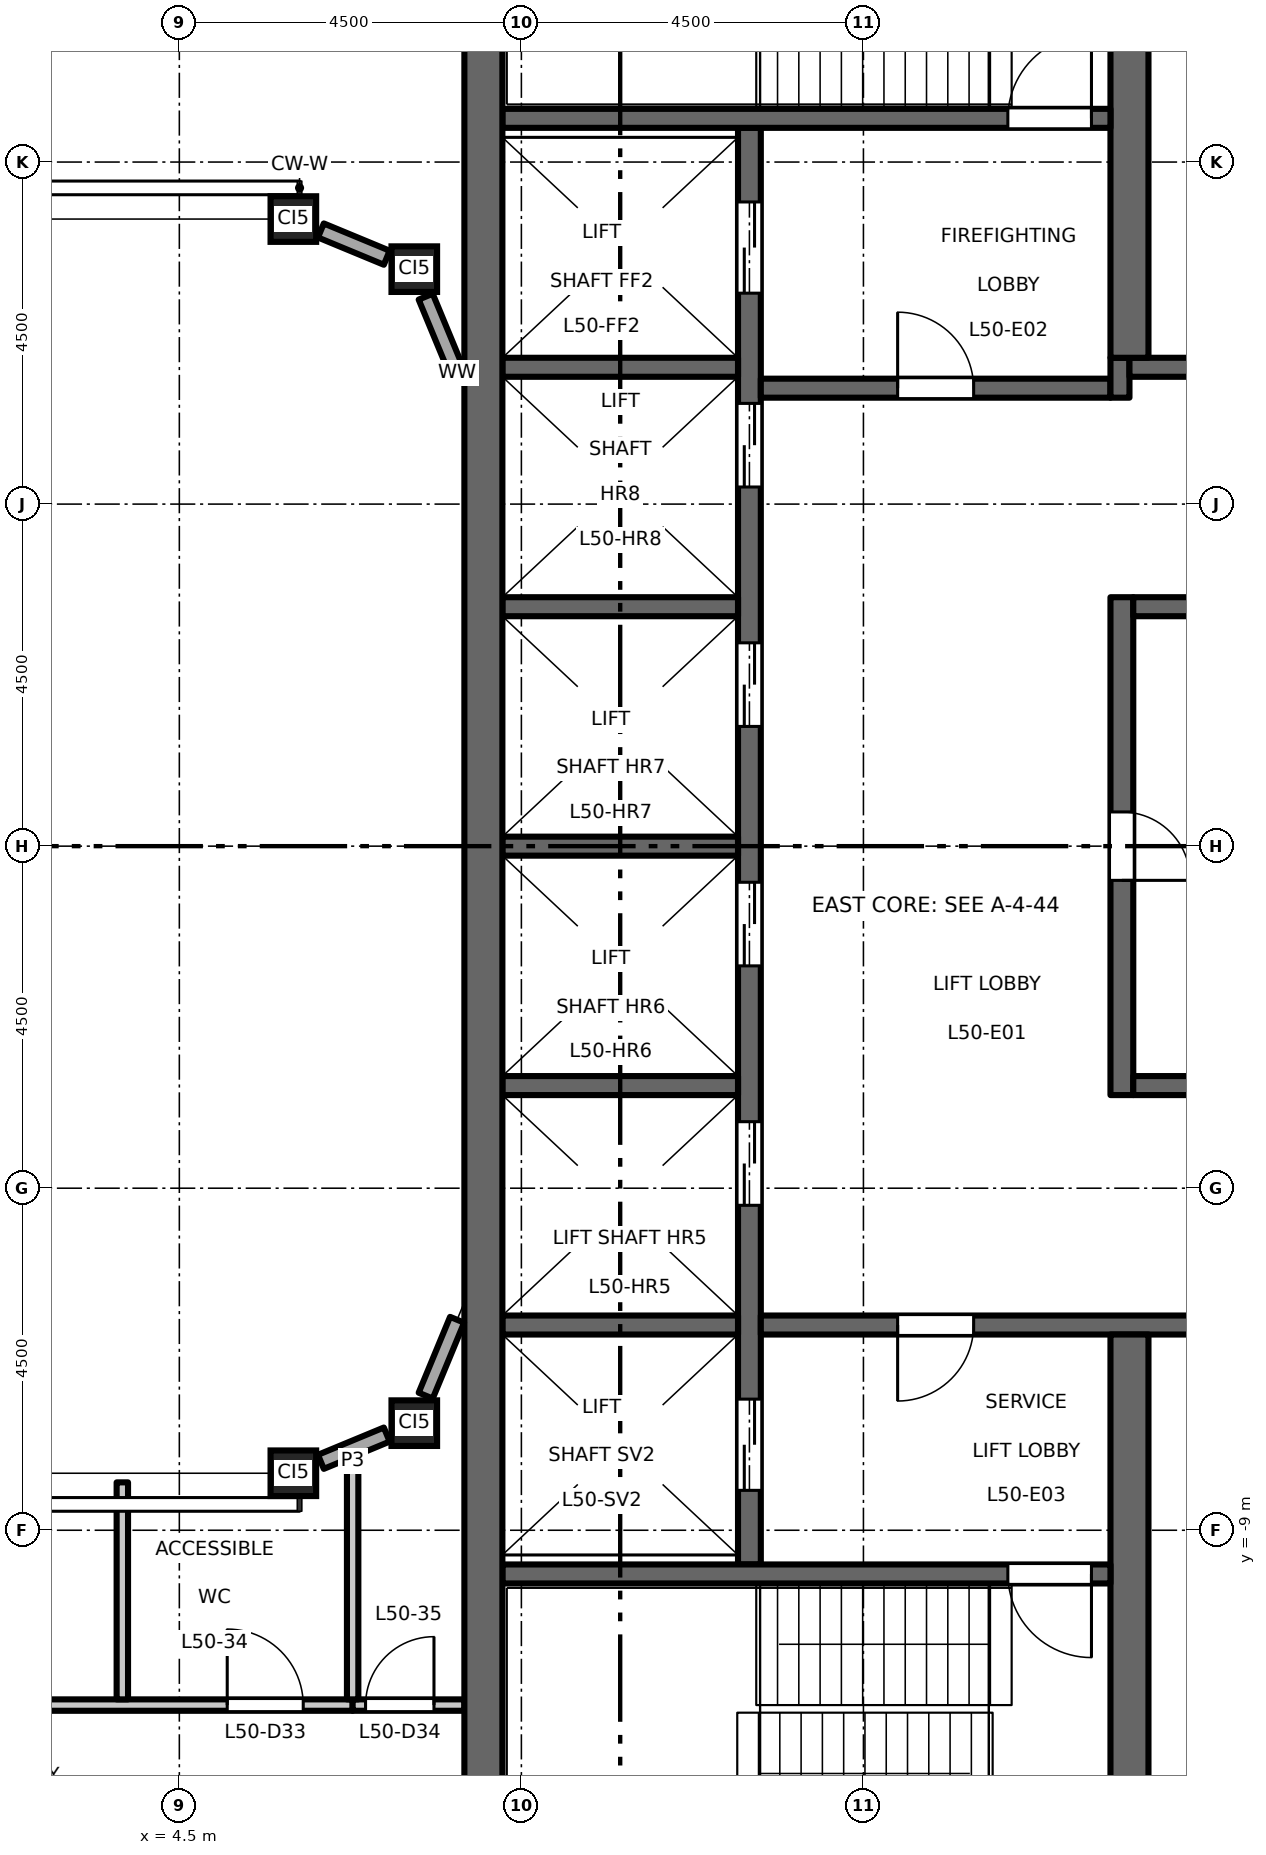
"""IFC4 building model, lengths in metres.
Left out: names, types, materials, properties, quantities, classifications, styles, units other than length and angle.
Written with IfcOpenShell. Run it as: python <this file> out.ifc"""

import sys

from ifc_helpers import new_model, si_unit, direction, frame, frame_2d, origin, origin_2d, place, context, subcontext, project, spatial, rectangle, hollow_rectangle, extrude, element, fill, save


model = new_model("IFC4")
c1 = context("Model", 3, precision=1e-05, world=origin(), true_north=direction((0.0, 1.0)))
c2 = subcontext(c1, "Body", "Model", "MODEL_VIEW")
j1 = project(units=[si_unit("LENGTHUNIT", "METRE"), si_unit("PLANEANGLEUNIT", "RADIAN")], contexts=[c1])
p1 = place(None, origin())
s1 = spatial("IfcSite", under=j1, at=p1, CompositionType="ELEMENT")
p2 = place(p1, origin())
s2 = spatial("IfcBuilding", under=s1, at=p2, CompositionType="ELEMENT")
p3 = place(p2, frame((0.0, 0.0, 233.2)))
s3 = spatial("IfcBuildingStorey", under=s2, at=p3, CompositionType="ELEMENT", Elevation=233.2)
for number, where, z_axis, x_axis in (
    (1, (6.0, -8.25, 0.0), (0.0, 0.0, 1.0), (1.0, 0.0, 0.0)),
    (2, (7.591, -7.591, 0.0), (0.0, 0.0, 1.0), (1.0, 0.0, 0.0)),
    (3, (6.0, 8.25, 0.0), (0.0, 0.0, 1.0), (1.0, 0.0, 0.0)),
    (4, (7.591, 7.591, 0.0), (0.0, 0.0, 1.0), (1.0, 0.0, 0.0)),
):
    element("IfcColumn", number, at=place(p3, frame(where, z_axis=z_axis, x_axis=x_axis)), inside=s3, PredefinedType="COLUMN", context=c2, shape_type="SweptSolid", body=[
        extrude(hollow_rectangle(XDim=0.6, YDim=0.6, WallThickness=0.032, at=origin_2d()), origin(), (0.0, 0.0, 1.0), 4.5),
    ])
p4 = place(p3, frame((12.0, -9.45, 0.0), z_axis=(0.0, 0.0, 1.0), x_axis=(0.0, 1.0, 0.0)))
e5 = element("IfcWall", 5, at=p4, inside=s3, PredefinedType="SHEAR", context=c2, shape_type="SweptSolid", body=[
    extrude(rectangle(XDim=18.9, YDim=0.3, at=frame_2d((9.45, 0.0))), origin(), (0.0, 0.0, 1.0), 4.35),
])
p5 = place(p4, frame((4.725, 0.0, 0.0)))
e6 = element("IfcOpeningElement", 6, at=p5, cuts=e5, PredefinedType="OPENING", context=c2, shape_type="SweptSolid", body=[
    extrude(rectangle(XDim=1.1, YDim=2.1, at=frame_2d((0.55, 1.05))), frame((0.0, 0.16, 0.0), z_axis=(0.0, -1.0, 0.0), x_axis=(1.0, 0.0, 0.0)), (0.0, 0.0, 1.0), 0.32),
])
p6 = place(p4, frame((7.875, 0.0, 0.0)))
e7 = element("IfcOpeningElement", 7, at=p6, cuts=e5, PredefinedType="OPENING", context=c2, shape_type="SweptSolid", body=[
    extrude(rectangle(XDim=1.1, YDim=2.1, at=frame_2d((0.55, 1.05))), frame((0.0, 0.16, 0.0), z_axis=(0.0, -1.0, 0.0), x_axis=(1.0, 0.0, 0.0)), (0.0, 0.0, 1.0), 0.32),
])
p7 = place(p4, frame((11.025, 0.0, 0.0)))
e8 = element("IfcOpeningElement", 8, at=p7, cuts=e5, PredefinedType="OPENING", context=c2, shape_type="SweptSolid", body=[
    extrude(rectangle(XDim=1.1, YDim=2.1, at=frame_2d((0.55, 1.05))), frame((0.0, 0.16, 0.0), z_axis=(0.0, -1.0, 0.0), x_axis=(1.0, 0.0, 0.0)), (0.0, 0.0, 1.0), 0.32),
])
p8 = place(p4, frame((14.175, 0.0, 0.0)))
e9 = element("IfcOpeningElement", 9, at=p8, cuts=e5, PredefinedType="OPENING", context=c2, shape_type="SweptSolid", body=[
    extrude(rectangle(XDim=1.1, YDim=2.1, at=frame_2d((0.55, 1.05))), frame((0.0, 0.16, 0.0), z_axis=(0.0, -1.0, 0.0), x_axis=(1.0, 0.0, 0.0)), (0.0, 0.0, 1.0), 0.32),
])
p9 = place(p4, frame((16.725, 0.0, 0.0)))
e10 = element("IfcOpeningElement", 10, at=p9, cuts=e5, PredefinedType="OPENING", context=c2, shape_type="SweptSolid", body=[
    extrude(rectangle(XDim=1.2, YDim=2.1, at=frame_2d((0.6, 1.05))), frame((0.0, 0.16, 0.0), z_axis=(0.0, -1.0, 0.0), x_axis=(1.0, 0.0, 0.0)), (0.0, 0.0, 1.0), 0.32),
])
p10 = place(p4, frame((0.975, 0.0, 0.0)))
e11 = element("IfcOpeningElement", 11, at=p10, cuts=e5, PredefinedType="OPENING", context=c2, shape_type="SweptSolid", body=[
    extrude(rectangle(XDim=1.2, YDim=2.1, at=frame_2d((0.6, 1.05))), frame((0.0, 0.16, 0.0), z_axis=(0.0, -1.0, 0.0), x_axis=(1.0, 0.0, 0.0)), (0.0, 0.0, 1.0), 0.32),
])
p11 = place(p3, frame((12.15, 6.025, 0.0), z_axis=(0.0, 0.0, 1.0), x_axis=(1.0, 0.0, 0.0)))
e12 = element("IfcWall", 12, at=p11, inside=s3, PredefinedType="SHEAR", context=c2, shape_type="SweptSolid", body=[
    extrude(rectangle(XDim=4.6, YDim=0.25, at=frame_2d((2.3, 0.0))), origin(), (0.0, 0.0, 1.0), 4.35),
])
p12 = place(p11, frame((1.8, 0.0, 0.0)))
e13 = element("IfcOpeningElement", 13, at=p12, cuts=e12, PredefinedType="OPENING", context=c2, shape_type="SweptSolid", body=[
    extrude(rectangle(XDim=1.0, YDim=2.1, at=frame_2d((0.5, 1.05))), frame((0.0, 0.135, 0.0), z_axis=(0.0, -1.0, 0.0), x_axis=(1.0, 0.0, 0.0)), (0.0, 0.0, 1.0), 0.27),
])
p13 = place(p3, frame((16.875, 5.9, 0.0), z_axis=(0.0, 0.0, 1.0), x_axis=(0.0, 1.0, 0.0)))
e14 = element("IfcWall", 14, at=p13, inside=s3, PredefinedType="SHEAR", context=c2, shape_type="SweptSolid", body=[
    extrude(rectangle(XDim=0.525, YDim=0.25, at=frame_2d((0.263, 0.0))), origin(), (0.0, 0.0, 1.0), 4.35),
])
p14 = place(p3, frame((17.0, 6.3, 0.0), z_axis=(0.0, 0.0, 1.0), x_axis=(1.0, 0.0, 0.0)))
e15 = element("IfcWall", 15, at=p14, inside=s3, PredefinedType="SHEAR", context=c2, shape_type="SweptSolid", body=[
    extrude(rectangle(XDim=4.25, YDim=0.25, at=frame_2d((2.125, 0.0))), origin(), (0.0, 0.0, 1.0), 4.35),
])
p15 = place(p3, frame((12.15, -6.3, 0.0), z_axis=(0.0, 0.0, 1.0), x_axis=(1.0, 0.0, 0.0)))
e16 = element("IfcWall", 16, at=p15, inside=s3, PredefinedType="SHEAR", context=c2, shape_type="SweptSolid", body=[
    extrude(rectangle(XDim=9.1, YDim=0.25, at=frame_2d((4.55, 0.0))), origin(), (0.0, 0.0, 1.0), 4.35),
])
p16 = place(p15, frame((1.8, 0.0, 0.0)))
e17 = element("IfcOpeningElement", 17, at=p16, cuts=e16, PredefinedType="OPENING", context=c2, shape_type="SweptSolid", body=[
    extrude(rectangle(XDim=1.0, YDim=2.1, at=frame_2d((0.5, 1.05))), frame((0.0, 0.135, 0.0), z_axis=(0.0, -1.0, 0.0), x_axis=(1.0, 0.0, 0.0)), (0.0, 0.0, 1.0), 0.27),
])
p17 = place(p3, frame((16.9, -3.275, 0.0), z_axis=(0.0, 0.0, 1.0), x_axis=(0.0, 1.0, 0.0)))
e18 = element("IfcWall", 18, at=p17, inside=s3, PredefinedType="SHEAR", context=c2, shape_type="SweptSolid", body=[
    extrude(rectangle(XDim=6.55, YDim=0.3, at=frame_2d((3.275, 0.0))), origin(), (0.0, 0.0, 1.0), 4.35),
])
p18 = place(p17, frame((2.825, 0.0, 0.0)))
e19 = element("IfcOpeningElement", 19, at=p18, cuts=e18, PredefinedType="OPENING", context=c2, shape_type="SweptSolid", body=[
    extrude(rectangle(XDim=0.9, YDim=2.1, at=frame_2d((0.45, 1.05))), frame((0.0, 0.16, 0.0), z_axis=(0.0, -1.0, 0.0), x_axis=(1.0, 0.0, 0.0)), (0.0, 0.0, 1.0), 0.32),
])
for number, where, z_axis, x_axis in (
    (20, (17.05, 3.15, 0.0), (0.0, 0.0, 1.0), (1.0, 0.0, 0.0)),
    (21, (17.05, -3.15, 0.0), (0.0, 0.0, 1.0), (1.0, 0.0, 0.0)),
):
    element("IfcWall", number, at=place(p3, frame(where, z_axis=z_axis, x_axis=x_axis)), inside=s3, PredefinedType="SHEAR", context=c2, shape_type="SweptSolid", body=[
        extrude(rectangle(XDim=4.2, YDim=0.25, at=frame_2d((2.1, 0.0))), origin(), (0.0, 0.0, 1.0), 4.35),
    ])
for number, where, z_axis, x_axis in (
    (22, (17.0, 6.425, 0.0), (0.0, 0.0, 1.0), (0.0, 1.0, 0.0)),
    (23, (17.0, -13.0, 0.0), (0.0, 0.0, 1.0), (0.0, 1.0, 0.0)),
):
    element("IfcWall", number, at=place(p3, frame(where, z_axis=z_axis, x_axis=x_axis)), inside=s3, PredefinedType="SHEAR", context=c2, shape_type="SweptSolid", body=[
        extrude(rectangle(XDim=6.575, YDim=0.5, at=frame_2d((3.288, 0.0))), origin(), (0.0, 0.0, 1.0), 4.35),
    ])
for number, where, z_axis, x_axis in (
    (24, (8.75, 0.0, 0.0), (0.0, 0.0, 1.0), (1.0, 0.0, 0.0)),
    (25, (8.75, 3.15, 0.0), (0.0, 0.0, 1.0), (1.0, 0.0, 0.0)),
    (26, (8.75, 6.3, 0.0), (0.0, 0.0, 1.0), (1.0, 0.0, 0.0)),
    (27, (8.75, -3.15, 0.0), (0.0, 0.0, 1.0), (1.0, 0.0, 0.0)),
    (28, (8.75, -6.3, 0.0), (0.0, 0.0, 1.0), (1.0, 0.0, 0.0)),
):
    element("IfcWall", number, at=place(p3, frame(where, z_axis=z_axis, x_axis=x_axis)), inside=s3, PredefinedType="SHEAR", context=c2, shape_type="SweptSolid", body=[
        extrude(rectangle(XDim=3.1, YDim=0.25, at=frame_2d((1.55, 0.0))), origin(), (0.0, 0.0, 1.0), 4.35),
    ])
p19 = place(p3, frame((8.75, 9.575, 0.0), z_axis=(0.0, 0.0, 1.0), x_axis=(1.0, 0.0, 0.0)))
e29 = element("IfcWall", 29, at=p19, inside=s3, PredefinedType="SHEAR", context=c2, shape_type="SweptSolid", body=[
    extrude(rectangle(XDim=8.0, YDim=0.25, at=frame_2d((4.0, 0.0))), origin(), (0.0, 0.0, 1.0), 4.35),
])
p20 = place(p19, frame((6.65, 0.0, 0.0)))
e30 = element("IfcOpeningElement", 30, at=p20, cuts=e29, PredefinedType="OPENING", context=c2, shape_type="SweptSolid", body=[
    extrude(rectangle(XDim=1.1, YDim=2.1, at=frame_2d((0.55, 1.05))), frame((0.0, 0.135, 0.0), z_axis=(0.0, -1.0, 0.0), x_axis=(1.0, 0.0, 0.0)), (0.0, 0.0, 1.0), 0.27),
])
p21 = place(p3, frame((8.75, -9.575, 0.0), z_axis=(0.0, 0.0, 1.0), x_axis=(1.0, 0.0, 0.0)))
e31 = element("IfcWall", 31, at=p21, inside=s3, PredefinedType="SHEAR", context=c2, shape_type="SweptSolid", body=[
    extrude(rectangle(XDim=8.0, YDim=0.25, at=frame_2d((4.0, 0.0))), origin(), (0.0, 0.0, 1.0), 4.35),
])
p22 = place(p21, frame((6.65, 0.0, 0.0)))
e32 = element("IfcOpeningElement", 32, at=p22, cuts=e31, PredefinedType="OPENING", context=c2, shape_type="SweptSolid", body=[
    extrude(rectangle(XDim=1.1, YDim=2.1, at=frame_2d((0.55, 1.05))), frame((0.0, 0.135, 0.0), z_axis=(0.0, -1.0, 0.0), x_axis=(1.0, 0.0, 0.0)), (0.0, 0.0, 1.0), 0.27),
])
p23 = place(p3, frame((8.5, -13.0, 0.0), z_axis=(0.0, 0.0, 1.0), x_axis=(0.0, 1.0, 0.0)))
e33 = element("IfcWall", 33, at=p23, inside=s3, PredefinedType="SHEAR", context=c2, shape_type="SweptSolid", body=[
    extrude(rectangle(XDim=26.0, YDim=0.5, at=frame_2d((13.0, 0.0))), origin(), (0.0, 0.0, 1.0), 4.35),
])
p24 = place(p3, frame((6.362, -8.1, 0.0), z_axis=(0.0, 0.0, 1.0), x_axis=(0.923829670615, 0.382803787458, 0.0)))
e34 = element("IfcWall", 34, at=p24, inside=s3, PredefinedType="STANDARD", context=c2, shape_type="SweptSolid", body=[
    extrude(rectangle(XDim=0.938, YDim=0.2, at=frame_2d((0.469, 0.0))), origin(), (0.0, 0.0, 1.0), 3.918),
])
for number, where, z_axis, x_axis in (
    (35, (7.741, -7.229, 0.0), (0.0, 0.0, 1.0), (0.383, 0.924, 0.0)),
    (36, (8.154, 6.231, 0.0), (0.0, 0.0, 1.0), (-0.383, 0.924, 0.0)),
):
    element("IfcWall", number, at=place(p3, frame(where, z_axis=z_axis, x_axis=x_axis)), inside=s3, PredefinedType="STANDARD", context=c2, shape_type="SweptSolid", body=[
        extrude(rectangle(XDim=1.08, YDim=0.2, at=frame_2d((0.54, 0.0))), origin(), (0.0, 0.0, 1.0), 3.918),
    ])
p25 = place(p3, frame((7.229, 7.741, 0.0), z_axis=(0.0, 0.0, 1.0), x_axis=(-0.923829670615, 0.382803787458, 0.0)))
e37 = element("IfcWall", 37, at=p25, inside=s3, PredefinedType="STANDARD", context=c2, shape_type="SweptSolid", body=[
    extrude(rectangle(XDim=0.938, YDim=0.2, at=frame_2d((0.469, 0.0))), origin(), (0.0, 0.0, 1.0), 3.918),
])
p26 = place(p3, frame((-8.25, -11.3, 0.0), z_axis=(0.0, 0.0, 1.0), x_axis=(1.0, 0.0, 0.0)))
e38 = element("IfcWall", 38, at=p26, inside=s3, PredefinedType="PARTITIONING", context=c2, shape_type="SweptSolid", body=[
    extrude(rectangle(XDim=15.03, YDim=0.15, at=frame_2d((7.515, 0.0))), origin(), (0.0, 0.0, 1.0), 4.35),
])
p27 = place(p26, frame((4.35, 0.0, 0.0)))
e39 = element("IfcOpeningElement", 39, at=p27, cuts=e38, PredefinedType="OPENING", context=c2, shape_type="SweptSolid", body=[
    extrude(rectangle(XDim=1.0, YDim=2.1, at=frame_2d((0.5, 1.05))), frame((0.0, 0.085, 0.0), z_axis=(0.0, -1.0, 0.0), x_axis=(1.0, 0.0, 0.0)), (0.0, 0.0, 1.0), 0.17),
])
p28 = place(p26, frame((6.6, 0.0, 0.0)))
e40 = element("IfcOpeningElement", 40, at=p28, cuts=e38, PredefinedType="OPENING", context=c2, shape_type="SweptSolid", body=[
    extrude(rectangle(XDim=1.0, YDim=2.1, at=frame_2d((0.5, 1.05))), frame((0.0, 0.085, 0.0), z_axis=(0.0, -1.0, 0.0), x_axis=(1.0, 0.0, 0.0)), (0.0, 0.0, 1.0), 0.17),
])
p29 = place(p26, frame((13.38, 0.0, 0.0)))
e41 = element("IfcOpeningElement", 41, at=p29, cuts=e38, PredefinedType="OPENING", context=c2, shape_type="SweptSolid", body=[
    extrude(rectangle(XDim=1.0, YDim=2.1, at=frame_2d((0.5, 1.05))), frame((0.0, 0.085, 0.0), z_axis=(0.0, -1.0, 0.0), x_axis=(1.0, 0.0, 0.0)), (0.0, 0.0, 1.0), 0.17),
])
p30 = place(p3, frame((6.78, -11.3, 0.0), z_axis=(0.0, 0.0, 1.0), x_axis=(1.0, 0.0, 0.0)))
e42 = element("IfcWall", 42, at=p30, inside=s3, PredefinedType="PARTITIONING", context=c2, shape_type="SweptSolid", body=[
    extrude(rectangle(XDim=1.47, YDim=0.15, at=frame_2d((0.735, 0.0))), origin(), (0.0, 0.0, 1.0), 4.35),
])
p31 = place(p30, frame((0.17, 0.0, 0.0)))
e43 = element("IfcOpeningElement", 43, at=p31, cuts=e42, PredefinedType="OPENING", context=c2, shape_type="SweptSolid", body=[
    extrude(rectangle(XDim=0.9, YDim=2.1, at=frame_2d((0.45, 1.05))), frame((0.0, 0.085, 0.0), z_axis=(0.0, -1.0, 0.0), x_axis=(1.0, 0.0, 0.0)), (0.0, 0.0, 1.0), 0.17),
])
p32 = place(p3, frame((3.75, -11.225, 0.0), z_axis=(0.0, 0.0, 1.0), x_axis=(0.0, 1.0, 0.0)))
e44 = element("IfcWall", 44, at=p32, inside=s3, PredefinedType="PARTITIONING", context=c2, shape_type="SweptSolid", body=[
    extrude(rectangle(XDim=2.855, YDim=0.15, at=frame_2d((1.427, 0.0))), origin(), (0.0, 0.0, 1.0), 4.35),
])
p33 = place(p3, frame((6.78, -11.225, 0.0), z_axis=(0.0, 0.0, 1.0), x_axis=(0.0, 1.0, 0.0)))
e45 = element("IfcWall", 45, at=p33, inside=s3, PredefinedType="PARTITIONING", context=c2, shape_type="SweptSolid", body=[
    extrude(rectangle(XDim=3.138, YDim=0.15, at=frame_2d((1.569, 0.0))), origin(), (0.0, 0.0, 1.0), 4.35),
])
p34 = place(p12, origin())
e46 = element("IfcDoor", 46, at=p34, inside=s3, OperationType="SINGLE_SWING_RIGHT", PredefinedType="DOOR", context=c2, shape_type="SweptSolid", body=[
    extrude(rectangle(XDim=1.0, YDim=2.1, at=frame_2d((0.5, 1.05))), frame((0.0, 0.025, 0.0), z_axis=(0.0, -1.0, 0.0), x_axis=(1.0, 0.0, 0.0)), (0.0, 0.0, 1.0), 0.05),
])
fill(e13, e46)
p35 = place(p16, origin())
e47 = element("IfcDoor", 47, at=p35, inside=s3, OperationType="SINGLE_SWING_LEFT", PredefinedType="DOOR", context=c2, shape_type="SweptSolid", body=[
    extrude(rectangle(XDim=1.0, YDim=2.1, at=frame_2d((0.5, 1.05))), frame((0.0, 0.025, 0.0), z_axis=(0.0, -1.0, 0.0), x_axis=(1.0, 0.0, 0.0)), (0.0, 0.0, 1.0), 0.05),
])
fill(e17, e47)
p36 = place(p20, origin())
e48 = element("IfcDoor", 48, at=p36, inside=s3, OperationType="SINGLE_SWING_LEFT", PredefinedType="DOOR", context=c2, shape_type="SweptSolid", body=[
    extrude(rectangle(XDim=1.1, YDim=2.1, at=frame_2d((0.55, 1.05))), frame((0.0, 0.025, 0.0), z_axis=(0.0, -1.0, 0.0), x_axis=(1.0, 0.0, 0.0)), (0.0, 0.0, 1.0), 0.05),
])
fill(e30, e48)
p37 = place(p22, origin())
e49 = element("IfcDoor", 49, at=p37, inside=s3, OperationType="SINGLE_SWING_RIGHT", PredefinedType="DOOR", context=c2, shape_type="SweptSolid", body=[
    extrude(rectangle(XDim=1.1, YDim=2.1, at=frame_2d((0.55, 1.05))), frame((0.0, 0.025, 0.0), z_axis=(0.0, -1.0, 0.0), x_axis=(1.0, 0.0, 0.0)), (0.0, 0.0, 1.0), 0.05),
])
fill(e32, e49)
p38 = place(p5, origin())
e50 = element("IfcDoor", 50, at=p38, inside=s3, OperationType="DOUBLE_DOOR_SLIDING", PredefinedType="DOOR", context=c2, shape_type="SweptSolid", body=[
    extrude(rectangle(XDim=1.1, YDim=2.1, at=frame_2d((0.55, 1.05))), frame((0.0, 0.025, 0.0), z_axis=(0.0, -1.0, 0.0), x_axis=(1.0, 0.0, 0.0)), (0.0, 0.0, 1.0), 0.05),
])
fill(e6, e50)
p39 = place(p6, origin())
e51 = element("IfcDoor", 51, at=p39, inside=s3, OperationType="DOUBLE_DOOR_SLIDING", PredefinedType="DOOR", context=c2, shape_type="SweptSolid", body=[
    extrude(rectangle(XDim=1.1, YDim=2.1, at=frame_2d((0.55, 1.05))), frame((0.0, 0.025, 0.0), z_axis=(0.0, -1.0, 0.0), x_axis=(1.0, 0.0, 0.0)), (0.0, 0.0, 1.0), 0.05),
])
fill(e7, e51)
p40 = place(p7, origin())
e52 = element("IfcDoor", 52, at=p40, inside=s3, OperationType="DOUBLE_DOOR_SLIDING", PredefinedType="DOOR", context=c2, shape_type="SweptSolid", body=[
    extrude(rectangle(XDim=1.1, YDim=2.1, at=frame_2d((0.55, 1.05))), frame((0.0, 0.025, 0.0), z_axis=(0.0, -1.0, 0.0), x_axis=(1.0, 0.0, 0.0)), (0.0, 0.0, 1.0), 0.05),
])
fill(e8, e52)
p41 = place(p8, origin())
e53 = element("IfcDoor", 53, at=p41, inside=s3, OperationType="DOUBLE_DOOR_SLIDING", PredefinedType="DOOR", context=c2, shape_type="SweptSolid", body=[
    extrude(rectangle(XDim=1.1, YDim=2.1, at=frame_2d((0.55, 1.05))), frame((0.0, 0.025, 0.0), z_axis=(0.0, -1.0, 0.0), x_axis=(1.0, 0.0, 0.0)), (0.0, 0.0, 1.0), 0.05),
])
fill(e9, e53)
p42 = place(p9, origin())
e54 = element("IfcDoor", 54, at=p42, inside=s3, OperationType="DOUBLE_DOOR_SLIDING", PredefinedType="DOOR", context=c2, shape_type="SweptSolid", body=[
    extrude(rectangle(XDim=1.2, YDim=2.1, at=frame_2d((0.6, 1.05))), frame((0.0, 0.025, 0.0), z_axis=(0.0, -1.0, 0.0), x_axis=(1.0, 0.0, 0.0)), (0.0, 0.0, 1.0), 0.05),
])
fill(e10, e54)
p43 = place(p10, origin())
e55 = element("IfcDoor", 55, at=p43, inside=s3, OperationType="DOUBLE_DOOR_SLIDING", PredefinedType="DOOR", context=c2, shape_type="SweptSolid", body=[
    extrude(rectangle(XDim=1.2, YDim=2.1, at=frame_2d((0.6, 1.05))), frame((0.0, 0.025, 0.0), z_axis=(0.0, -1.0, 0.0), x_axis=(1.0, 0.0, 0.0)), (0.0, 0.0, 1.0), 0.05),
])
fill(e11, e55)
p44 = place(p18, origin())
e56 = element("IfcDoor", 56, at=p44, inside=s3, OperationType="SINGLE_SWING_LEFT", PredefinedType="DOOR", context=c2, shape_type="SweptSolid", body=[
    extrude(rectangle(XDim=0.9, YDim=2.1, at=frame_2d((0.45, 1.05))), frame((0.0, 0.025, 0.0), z_axis=(0.0, -1.0, 0.0), x_axis=(1.0, 0.0, 0.0)), (0.0, 0.0, 1.0), 0.05),
])
fill(e19, e56)
p45 = place(p29, origin())
e57 = element("IfcDoor", 57, at=p45, inside=s3, OperationType="SINGLE_SWING_LEFT", PredefinedType="DOOR", context=c2, shape_type="SweptSolid", body=[
    extrude(rectangle(XDim=1.0, YDim=2.1, at=frame_2d((0.5, 1.05))), frame((0.0, 0.025, 0.0), z_axis=(0.0, -1.0, 0.0), x_axis=(1.0, 0.0, 0.0)), (0.0, 0.0, 1.0), 0.05),
])
fill(e41, e57)
p46 = place(p31, origin())
e58 = element("IfcDoor", 58, at=p46, inside=s3, OperationType="SINGLE_SWING_RIGHT", PredefinedType="DOOR", context=c2, shape_type="SweptSolid", body=[
    extrude(rectangle(XDim=0.9, YDim=2.1, at=frame_2d((0.45, 1.05))), frame((0.0, 0.025, 0.0), z_axis=(0.0, -1.0, 0.0), x_axis=(1.0, 0.0, 0.0)), (0.0, 0.0, 1.0), 0.05),
])
fill(e43, e58)
save(model, sys.argv[1])
